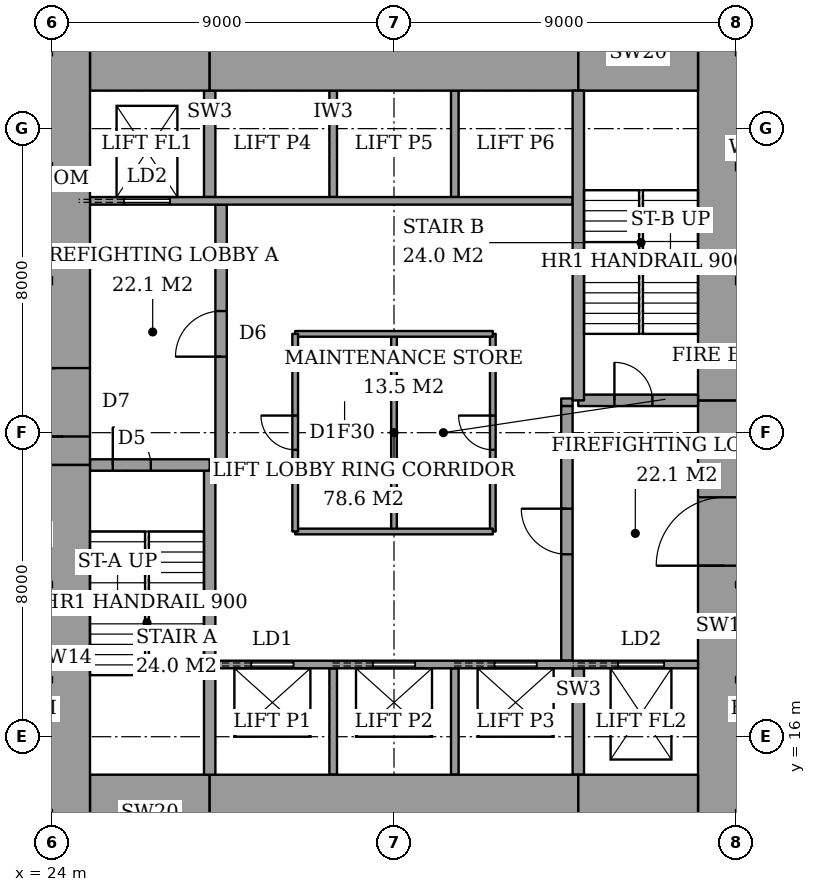
"""IFC4 building model, lengths in metres.
Left out: names, types, materials, properties, quantities, classifications, styles, units other than length and angle.
Written with IfcOpenShell. Run it as: python <this file> out.ifc"""

import sys

from ifc_helpers import new_model, si_unit, direction, frame, frame_2d, origin, place, context, subcontext, project, spatial, rectangle, extrude, element, fill, save


model = new_model("IFC4")
c1 = context("Model", 3, precision=1e-05, world=origin(), true_north=direction((0.0, 1.0)))
c2 = subcontext(c1, "Body", "Model", "MODEL_VIEW")
j1 = project(units=[si_unit("LENGTHUNIT", "METRE"), si_unit("PLANEANGLEUNIT", "RADIAN")], contexts=[c1])
p1 = place(None, origin())
s1 = spatial("IfcSite", under=j1, at=p1, CompositionType="ELEMENT")
p2 = place(p1, origin())
s2 = spatial("IfcBuilding", under=s1, at=p2, CompositionType="ELEMENT")
p3 = place(p2, frame((0.0, 0.0, 171.8)))
s3 = spatial("IfcBuildingStorey", under=s2, at=p3, CompositionType="ELEMENT", Elevation=171.8)
p4 = place(p3, frame((25.0, 14.0, 0.0), z_axis=(0.0, 0.0, 1.0), x_axis=(1.0, 0.0, 0.0)))
e1 = element("IfcWall", 1, at=p4, inside=s3, PredefinedType="SHEAR", context=c2, shape_type="SweptSolid", body=[
    extrude(rectangle(XDim=3.15, YDim=2.0, at=frame_2d((1.575, 0.0))), origin(), (0.0, 0.0, 1.0), 5.4),
])
p5 = place(p3, frame((28.15, 14.0, 0.0), z_axis=(0.0, 0.0, 1.0), x_axis=(1.0, 0.0, 0.0)))
e2 = element("IfcWall", 2, at=p5, inside=s3, PredefinedType="SHEAR", context=c2, shape_type="SweptSolid", body=[
    extrude(rectangle(XDim=9.7, YDim=2.0, at=frame_2d((4.85, 0.0))), origin(), (0.0, 0.0, 1.0), 5.4),
])
for number, where, z_axis, x_axis in (
    (3, (37.85, 14.0, 0.0), (0.0, 0.0, 1.0), (1.0, 0.0, 0.0)),
    (4, (25.0, 34.0, 0.0), (0.0, 0.0, 1.0), (1.0, 0.0, 0.0)),
):
    element("IfcWall", number, at=place(p3, frame(where, z_axis=z_axis, x_axis=x_axis)), inside=s3, PredefinedType="SHEAR", context=c2, shape_type="SweptSolid", body=[
        extrude(rectangle(XDim=3.15, YDim=2.0, at=frame_2d((1.575, 0.0))), origin(), (0.0, 0.0, 1.0), 5.4),
    ])
p6 = place(p3, frame((28.15, 34.0, 0.0), z_axis=(0.0, 0.0, 1.0), x_axis=(1.0, 0.0, 0.0)))
e5 = element("IfcWall", 5, at=p6, inside=s3, PredefinedType="SHEAR", context=c2, shape_type="SweptSolid", body=[
    extrude(rectangle(XDim=9.7, YDim=2.0, at=frame_2d((4.85, 0.0))), origin(), (0.0, 0.0, 1.0), 5.4),
])
p7 = place(p3, frame((37.85, 34.0, 0.0), z_axis=(0.0, 0.0, 1.0), x_axis=(1.0, 0.0, 0.0)))
e6 = element("IfcWall", 6, at=p7, inside=s3, PredefinedType="SHEAR", context=c2, shape_type="SweptSolid", body=[
    extrude(rectangle(XDim=3.15, YDim=2.0, at=frame_2d((1.575, 0.0))), origin(), (0.0, 0.0, 1.0), 5.4),
])
p8 = place(p3, frame((24.3, 13.0, 0.0), z_axis=(0.0, 0.0, 1.0), x_axis=(0.0, 1.0, 0.0)))
e7 = element("IfcWall", 7, at=p8, inside=s3, PredefinedType="SHEAR", context=c2, shape_type="SweptSolid", body=[
    extrude(rectangle(XDim=10.15, YDim=1.4, at=frame_2d((5.075, 0.0))), origin(), (0.0, 0.0, 1.0), 5.4),
])
p9 = place(p3, frame((24.3, 23.15, 0.0), z_axis=(0.0, 0.0, 1.0), x_axis=(0.0, 1.0, 0.0)))
e8 = element("IfcWall", 8, at=p9, inside=s3, PredefinedType="SHEAR", context=c2, shape_type="SweptSolid", body=[
    extrude(rectangle(XDim=11.85, YDim=1.4, at=frame_2d((5.925, 0.0))), origin(), (0.0, 0.0, 1.0), 5.4),
])
p10 = place(p9, frame((0.75, 0.0, 0.0)))
e9 = element("IfcOpeningElement", 9, at=p10, cuts=e8, PredefinedType="OPENING", context=c2, shape_type="SweptSolid", body=[
    extrude(rectangle(XDim=1.8, YDim=2.4, at=frame_2d((0.9, 1.2))), frame((0.0, 0.71, 0.0), z_axis=(0.0, -1.0, 0.0), x_axis=(1.0, 0.0, 0.0)), (0.0, 0.0, 1.0), 1.42),
])
p11 = place(p3, frame((41.7, 13.0, 0.0), z_axis=(0.0, 0.0, 1.0), x_axis=(0.0, 1.0, 0.0)))
e10 = element("IfcWall", 10, at=p11, inside=s3, PredefinedType="SHEAR", context=c2, shape_type="SweptSolid", body=[
    extrude(rectangle(XDim=11.85, YDim=1.4, at=frame_2d((5.925, 0.0))), origin(), (0.0, 0.0, 1.0), 5.4),
])
p12 = place(p11, frame((7.5, 0.0, 0.0)))
e11 = element("IfcOpeningElement", 11, at=p12, cuts=e10, PredefinedType="OPENING", context=c2, shape_type="SweptSolid", body=[
    extrude(rectangle(XDim=1.8, YDim=2.4, at=frame_2d((0.9, 1.2))), frame((0.0, 0.71, 0.0), z_axis=(0.0, -1.0, 0.0), x_axis=(1.0, 0.0, 0.0)), (0.0, 0.0, 1.0), 1.42),
])
p13 = place(p3, frame((41.7, 24.85, 0.0), z_axis=(0.0, 0.0, 1.0), x_axis=(0.0, 1.0, 0.0)))
e12 = element("IfcWall", 12, at=p13, inside=s3, PredefinedType="SHEAR", context=c2, shape_type="SweptSolid", body=[
    extrude(rectangle(XDim=10.15, YDim=1.4, at=frame_2d((5.075, 0.0))), origin(), (0.0, 0.0, 1.0), 5.4),
])
p14 = place(p3, frame((28.15, 15.0, 0.0), z_axis=(0.0, 0.0, 1.0), x_axis=(0.0, 1.0, 0.0)))
e13 = element("IfcWall", 13, at=p14, inside=s3, PredefinedType="SHEAR", context=c2, shape_type="SweptSolid", body=[
    extrude(rectangle(XDim=8.15, YDim=0.3, at=frame_2d((4.075, 0.0))), origin(), (0.0, 0.0, 1.0), 5.4),
])
p15 = place(p3, frame((25.0, 23.15, 0.0), z_axis=(0.0, 0.0, 1.0), x_axis=(1.0, 0.0, 0.0)))
e14 = element("IfcWall", 14, at=p15, inside=s3, PredefinedType="SHEAR", context=c2, shape_type="SweptSolid", body=[
    extrude(rectangle(XDim=3.15, YDim=0.3, at=frame_2d((1.575, 0.0))), origin(), (0.0, 0.0, 1.0), 5.4),
])
p16 = place(p15, frame((0.6, 0.0, 0.0)))
e15 = element("IfcOpeningElement", 15, at=p16, cuts=e14, PredefinedType="OPENING", context=c2, shape_type="SweptSolid", body=[
    extrude(rectangle(XDim=1.0, YDim=2.1, at=frame_2d((0.5, 1.05))), frame((0.0, 0.16, 0.0), z_axis=(0.0, -1.0, 0.0), x_axis=(1.0, 0.0, 0.0)), (0.0, 0.0, 1.0), 0.32),
])
p17 = place(p3, frame((37.85, 24.85, 0.0), z_axis=(0.0, 0.0, 1.0), x_axis=(0.0, 1.0, 0.0)))
e16 = element("IfcWall", 16, at=p17, inside=s3, PredefinedType="SHEAR", context=c2, shape_type="SweptSolid", body=[
    extrude(rectangle(XDim=8.15, YDim=0.3, at=frame_2d((4.075, 0.0))), origin(), (0.0, 0.0, 1.0), 5.4),
])
p18 = place(p3, frame((37.85, 24.85, 0.0), z_axis=(0.0, 0.0, 1.0), x_axis=(1.0, 0.0, 0.0)))
e17 = element("IfcWall", 17, at=p18, inside=s3, PredefinedType="SHEAR", context=c2, shape_type="SweptSolid", body=[
    extrude(rectangle(XDim=3.15, YDim=0.3, at=frame_2d((1.575, 0.0))), origin(), (0.0, 0.0, 1.0), 5.4),
])
p19 = place(p18, frame((0.95, 0.0, 0.0)))
e18 = element("IfcOpeningElement", 18, at=p19, cuts=e17, PredefinedType="OPENING", context=c2, shape_type="SweptSolid", body=[
    extrude(rectangle(XDim=1.0, YDim=2.1, at=frame_2d((0.5, 1.05))), frame((0.0, 0.16, 0.0), z_axis=(0.0, -1.0, 0.0), x_axis=(1.0, 0.0, 0.0)), (0.0, 0.0, 1.0), 0.32),
])
p20 = place(p3, frame((28.45, 23.3, 0.0), z_axis=(0.0, 0.0, 1.0), x_axis=(0.0, 1.0, 0.0)))
e19 = element("IfcWall", 19, at=p20, inside=s3, PredefinedType="PARTITIONING", context=c2, shape_type="SweptSolid", body=[
    extrude(rectangle(XDim=6.7, YDim=0.3, at=frame_2d((3.35, 0.0))), origin(), (0.0, 0.0, 1.0), 5.4),
])
p21 = place(p20, frame((2.7, 0.0, 0.0)))
e20 = element("IfcOpeningElement", 20, at=p21, cuts=e19, PredefinedType="OPENING", context=c2, shape_type="SweptSolid", body=[
    extrude(rectangle(XDim=1.2, YDim=2.1, at=frame_2d((0.6, 1.05))), frame((0.0, 0.16, 0.0), z_axis=(0.0, -1.0, 0.0), x_axis=(1.0, 0.0, 0.0)), (0.0, 0.0, 1.0), 0.32),
])
p22 = place(p3, frame((37.55, 18.0, 0.0), z_axis=(0.0, 0.0, 1.0), x_axis=(0.0, 1.0, 0.0)))
e21 = element("IfcWall", 21, at=p22, inside=s3, PredefinedType="PARTITIONING", context=c2, shape_type="SweptSolid", body=[
    extrude(rectangle(XDim=6.7, YDim=0.3, at=frame_2d((3.35, 0.0))), origin(), (0.0, 0.0, 1.0), 5.4),
])
p23 = place(p22, frame((2.8, 0.0, 0.0)))
e22 = element("IfcOpeningElement", 22, at=p23, cuts=e21, PredefinedType="OPENING", context=c2, shape_type="SweptSolid", body=[
    extrude(rectangle(XDim=1.2, YDim=2.1, at=frame_2d((0.6, 1.05))), frame((0.0, 0.16, 0.0), z_axis=(0.0, -1.0, 0.0), x_axis=(1.0, 0.0, 0.0)), (0.0, 0.0, 1.0), 0.32),
])
p24 = place(p3, frame((28.3, 17.9, 0.0), z_axis=(0.0, 0.0, 1.0), x_axis=(1.0, 0.0, 0.0)))
e23 = element("IfcWall", 23, at=p24, inside=s3, PredefinedType="PARTITIONING", context=c2, shape_type="SweptSolid", body=[
    extrude(rectangle(XDim=12.7, YDim=0.2, at=frame_2d((6.35, 0.0))), origin(), (0.0, 0.0, 1.0), 5.4),
])
p25 = place(p24, frame((0.95, 0.0, 0.0)))
e24 = element("IfcOpeningElement", 24, at=p25, cuts=e23, PredefinedType="OPENING", context=c2, shape_type="SweptSolid", body=[
    extrude(rectangle(XDim=1.1, YDim=2.1, at=frame_2d((0.55, 1.05))), frame((0.0, 0.11, 0.0), z_axis=(0.0, -1.0, 0.0), x_axis=(1.0, 0.0, 0.0)), (0.0, 0.0, 1.0), 0.22),
])
p26 = place(p24, frame((4.15, 0.0, 0.0)))
e25 = element("IfcOpeningElement", 25, at=p26, cuts=e23, PredefinedType="OPENING", context=c2, shape_type="SweptSolid", body=[
    extrude(rectangle(XDim=1.1, YDim=2.1, at=frame_2d((0.55, 1.05))), frame((0.0, 0.11, 0.0), z_axis=(0.0, -1.0, 0.0), x_axis=(1.0, 0.0, 0.0)), (0.0, 0.0, 1.0), 0.22),
])
p27 = place(p24, frame((7.35, 0.0, 0.0)))
e26 = element("IfcOpeningElement", 26, at=p27, cuts=e23, PredefinedType="OPENING", context=c2, shape_type="SweptSolid", body=[
    extrude(rectangle(XDim=1.1, YDim=2.1, at=frame_2d((0.55, 1.05))), frame((0.0, 0.11, 0.0), z_axis=(0.0, -1.0, 0.0), x_axis=(1.0, 0.0, 0.0)), (0.0, 0.0, 1.0), 0.22),
])
p28 = place(p24, frame((10.6, 0.0, 0.0)))
e27 = element("IfcOpeningElement", 27, at=p28, cuts=e23, PredefinedType="OPENING", context=c2, shape_type="SweptSolid", body=[
    extrude(rectangle(XDim=1.2, YDim=2.1, at=frame_2d((0.6, 1.05))), frame((0.0, 0.11, 0.0), z_axis=(0.0, -1.0, 0.0), x_axis=(1.0, 0.0, 0.0)), (0.0, 0.0, 1.0), 0.22),
])
p29 = place(p3, frame((25.0, 30.1, 0.0), z_axis=(0.0, 0.0, 1.0), x_axis=(1.0, 0.0, 0.0)))
e28 = element("IfcWall", 28, at=p29, inside=s3, PredefinedType="PARTITIONING", context=c2, shape_type="SweptSolid", body=[
    extrude(rectangle(XDim=12.7, YDim=0.2, at=frame_2d((6.35, 0.0))), origin(), (0.0, 0.0, 1.0), 5.4),
])
p30 = place(p29, frame((0.9, 0.0, 0.0)))
e29 = element("IfcOpeningElement", 29, at=p30, cuts=e28, PredefinedType="OPENING", context=c2, shape_type="SweptSolid", body=[
    extrude(rectangle(XDim=1.2, YDim=2.1, at=frame_2d((0.6, 1.05))), frame((0.0, 0.11, 0.0), z_axis=(0.0, -1.0, 0.0), x_axis=(1.0, 0.0, 0.0)), (0.0, 0.0, 1.0), 0.22),
])
for number, where, z_axis, x_axis in (
    (30, (31.4, 15.0, 0.0), (0.0, 0.0, 1.0), (0.0, 1.0, 0.0)),
    (31, (34.6, 15.0, 0.0), (0.0, 0.0, 1.0), (0.0, 1.0, 0.0)),
):
    element("IfcWall", number, at=place(p3, frame(where, z_axis=z_axis, x_axis=x_axis)), inside=s3, PredefinedType="PARTITIONING", context=c2, shape_type="SweptSolid", body=[
        extrude(rectangle(XDim=2.8, YDim=0.2, at=frame_2d((1.4, 0.0))), origin(), (0.0, 0.0, 1.0), 5.4),
    ])
p31 = place(p3, frame((37.85, 15.0, 0.0), z_axis=(0.0, 0.0, 1.0), x_axis=(0.0, 1.0, 0.0)))
e32 = element("IfcWall", 32, at=p31, inside=s3, PredefinedType="SHEAR", context=c2, shape_type="SweptSolid", body=[
    extrude(rectangle(XDim=2.8, YDim=0.3, at=frame_2d((1.4, 0.0))), origin(), (0.0, 0.0, 1.0), 5.4),
])
for number, where, z_axis, x_axis in (
    (33, (31.4, 30.2, 0.0), (0.0, 0.0, 1.0), (0.0, 1.0, 0.0)),
    (34, (34.6, 30.2, 0.0), (0.0, 0.0, 1.0), (0.0, 1.0, 0.0)),
):
    element("IfcWall", number, at=place(p3, frame(where, z_axis=z_axis, x_axis=x_axis)), inside=s3, PredefinedType="PARTITIONING", context=c2, shape_type="SweptSolid", body=[
        extrude(rectangle(XDim=2.8, YDim=0.2, at=frame_2d((1.4, 0.0))), origin(), (0.0, 0.0, 1.0), 5.4),
    ])
p32 = place(p3, frame((28.15, 30.2, 0.0), z_axis=(0.0, 0.0, 1.0), x_axis=(0.0, 1.0, 0.0)))
e35 = element("IfcWall", 35, at=p32, inside=s3, PredefinedType="SHEAR", context=c2, shape_type="SweptSolid", body=[
    extrude(rectangle(XDim=2.8, YDim=0.3, at=frame_2d((1.4, 0.0))), origin(), (0.0, 0.0, 1.0), 5.4),
])
for number, where, z_axis, x_axis in (
    (36, (28.3, 23.2, 0.0), (0.0, 0.0, 1.0), (1.0, 0.0, 0.0)),
    (37, (37.4, 24.8, 0.0), (0.0, 0.0, 1.0), (1.0, 0.0, 0.0)),
):
    element("IfcWall", number, at=place(p3, frame(where, z_axis=z_axis, x_axis=x_axis)), inside=s3, PredefinedType="PARTITIONING", context=c2, shape_type="SweptSolid", body=[
        extrude(rectangle(XDim=0.3, YDim=0.2, at=frame_2d((0.15, 0.0))), origin(), (0.0, 0.0, 1.0), 5.4),
    ])
for number, where, z_axis, x_axis in (
    (38, (30.4, 21.4, 0.0), (0.0, 0.0, 1.0), (1.0, 0.0, 0.0)),
    (39, (30.4, 26.6, 0.0), (0.0, 0.0, 1.0), (1.0, 0.0, 0.0)),
):
    element("IfcWall", number, at=place(p3, frame(where, z_axis=z_axis, x_axis=x_axis)), inside=s3, PredefinedType="PARTITIONING", context=c2, shape_type="SweptSolid", body=[
        extrude(rectangle(XDim=5.2, YDim=0.15, at=frame_2d((2.6, 0.0))), origin(), (0.0, 0.0, 1.0), 5.15),
    ])
p33 = place(p3, frame((30.4, 21.4, 0.0), z_axis=(0.0, 0.0, 1.0), x_axis=(0.0, 1.0, 0.0)))
e40 = element("IfcWall", 40, at=p33, inside=s3, PredefinedType="PARTITIONING", context=c2, shape_type="SweptSolid", body=[
    extrude(rectangle(XDim=5.2, YDim=0.15, at=frame_2d((2.6, 0.0))), origin(), (0.0, 0.0, 1.0), 5.15),
])
p34 = place(p33, frame((2.15, 0.0, 0.0)))
e41 = element("IfcOpeningElement", 41, at=p34, cuts=e40, PredefinedType="OPENING", context=c2, shape_type="SweptSolid", body=[
    extrude(rectangle(XDim=0.9, YDim=2.1, at=frame_2d((0.45, 1.05))), frame((0.0, 0.085, 0.0), z_axis=(0.0, -1.0, 0.0), x_axis=(1.0, 0.0, 0.0)), (0.0, 0.0, 1.0), 0.17),
])
p35 = place(p3, frame((35.6, 21.4, 0.0), z_axis=(0.0, 0.0, 1.0), x_axis=(0.0, 1.0, 0.0)))
e42 = element("IfcWall", 42, at=p35, inside=s3, PredefinedType="PARTITIONING", context=c2, shape_type="SweptSolid", body=[
    extrude(rectangle(XDim=5.2, YDim=0.15, at=frame_2d((2.6, 0.0))), origin(), (0.0, 0.0, 1.0), 5.15),
])
p36 = place(p35, frame((2.15, 0.0, 0.0)))
e43 = element("IfcOpeningElement", 43, at=p36, cuts=e42, PredefinedType="OPENING", context=c2, shape_type="SweptSolid", body=[
    extrude(rectangle(XDim=0.9, YDim=2.1, at=frame_2d((0.45, 1.05))), frame((0.0, 0.085, 0.0), z_axis=(0.0, -1.0, 0.0), x_axis=(1.0, 0.0, 0.0)), (0.0, 0.0, 1.0), 0.17),
])
p37 = place(p3, frame((33.0, 21.4, 0.0), z_axis=(0.0, 0.0, 1.0), x_axis=(0.0, 1.0, 0.0)))
e44 = element("IfcWall", 44, at=p37, inside=s3, PredefinedType="PARTITIONING", context=c2, shape_type="SweptSolid", body=[
    extrude(rectangle(XDim=5.2, YDim=0.15, at=frame_2d((2.6, 0.0))), origin(), (0.0, 0.0, 1.0), 5.15),
])
p38 = place(p16, origin())
e45 = element("IfcDoor", 45, at=p38, inside=s3, OperationType="SINGLE_SWING_RIGHT", PredefinedType="DOOR", context=c2, shape_type="SweptSolid", body=[
    extrude(rectangle(XDim=1.0, YDim=2.1, at=frame_2d((0.5, 1.05))), frame((0.0, 0.025, 0.0), z_axis=(0.0, -1.0, 0.0), x_axis=(1.0, 0.0, 0.0)), (0.0, 0.0, 1.0), 0.05),
])
fill(e15, e45)
p39 = place(p19, origin())
e46 = element("IfcDoor", 46, at=p39, inside=s3, OperationType="SINGLE_SWING_RIGHT", PredefinedType="DOOR", context=c2, shape_type="SweptSolid", body=[
    extrude(rectangle(XDim=1.0, YDim=2.1, at=frame_2d((0.5, 1.05))), frame((0.0, 0.025, 0.0), z_axis=(0.0, -1.0, 0.0), x_axis=(1.0, 0.0, 0.0)), (0.0, 0.0, 1.0), 0.05),
])
fill(e18, e46)
p40 = place(p21, origin())
e47 = element("IfcDoor", 47, at=p40, inside=s3, OperationType="SINGLE_SWING_RIGHT", PredefinedType="DOOR", context=c2, shape_type="SweptSolid", body=[
    extrude(rectangle(XDim=1.2, YDim=2.1, at=frame_2d((0.6, 1.05))), frame((0.0, 0.025, 0.0), z_axis=(0.0, -1.0, 0.0), x_axis=(1.0, 0.0, 0.0)), (0.0, 0.0, 1.0), 0.05),
])
fill(e20, e47)
p41 = place(p23, origin())
e48 = element("IfcDoor", 48, at=p41, inside=s3, OperationType="SINGLE_SWING_LEFT", PredefinedType="DOOR", context=c2, shape_type="SweptSolid", body=[
    extrude(rectangle(XDim=1.2, YDim=2.1, at=frame_2d((0.6, 1.05))), frame((0.0, 0.025, 0.0), z_axis=(0.0, -1.0, 0.0), x_axis=(1.0, 0.0, 0.0)), (0.0, 0.0, 1.0), 0.05),
])
fill(e22, e48)
p42 = place(p10, origin())
e49 = element("IfcDoor", 49, at=p42, inside=s3, OperationType="DOUBLE_DOOR_DOUBLE_SWING", PredefinedType="DOOR", context=c2, shape_type="SweptSolid", body=[
    extrude(rectangle(XDim=1.8, YDim=2.4, at=frame_2d((0.9, 1.2))), frame((0.0, 0.025, 0.0), z_axis=(0.0, -1.0, 0.0), x_axis=(1.0, 0.0, 0.0)), (0.0, 0.0, 1.0), 0.05),
])
fill(e9, e49)
p43 = place(p12, origin())
e50 = element("IfcDoor", 50, at=p43, inside=s3, OperationType="DOUBLE_DOOR_DOUBLE_SWING", PredefinedType="DOOR", context=c2, shape_type="SweptSolid", body=[
    extrude(rectangle(XDim=1.8, YDim=2.4, at=frame_2d((0.9, 1.2))), frame((0.0, 0.025, 0.0), z_axis=(0.0, -1.0, 0.0), x_axis=(1.0, 0.0, 0.0)), (0.0, 0.0, 1.0), 0.05),
])
fill(e11, e50)
p44 = place(p34, origin())
e51 = element("IfcDoor", 51, at=p44, inside=s3, OperationType="SINGLE_SWING_LEFT", PredefinedType="DOOR", context=c2, shape_type="SweptSolid", body=[
    extrude(rectangle(XDim=0.9, YDim=2.1, at=frame_2d((0.45, 1.05))), frame((0.0, 0.025, 0.0), z_axis=(0.0, -1.0, 0.0), x_axis=(1.0, 0.0, 0.0)), (0.0, 0.0, 1.0), 0.05),
])
fill(e41, e51)
p45 = place(p36, origin())
e52 = element("IfcDoor", 52, at=p45, inside=s3, OperationType="SINGLE_SWING_LEFT", PredefinedType="DOOR", context=c2, shape_type="SweptSolid", body=[
    extrude(rectangle(XDim=0.9, YDim=2.1, at=frame_2d((0.45, 1.05))), frame((0.0, 0.025, 0.0), z_axis=(0.0, -1.0, 0.0), x_axis=(1.0, 0.0, 0.0)), (0.0, 0.0, 1.0), 0.05),
])
fill(e43, e52)
p46 = place(p25, origin())
e53 = element("IfcDoor", 53, at=p46, inside=s3, OperationType="SLIDING_TO_LEFT", PredefinedType="DOOR", context=c2, shape_type="SweptSolid", body=[
    extrude(rectangle(XDim=1.1, YDim=2.1, at=frame_2d((0.55, 1.05))), frame((0.0, 0.025, 0.0), z_axis=(0.0, -1.0, 0.0), x_axis=(1.0, 0.0, 0.0)), (0.0, 0.0, 1.0), 0.05),
])
fill(e24, e53)
p47 = place(p26, origin())
e54 = element("IfcDoor", 54, at=p47, inside=s3, OperationType="SLIDING_TO_LEFT", PredefinedType="DOOR", context=c2, shape_type="SweptSolid", body=[
    extrude(rectangle(XDim=1.1, YDim=2.1, at=frame_2d((0.55, 1.05))), frame((0.0, 0.025, 0.0), z_axis=(0.0, -1.0, 0.0), x_axis=(1.0, 0.0, 0.0)), (0.0, 0.0, 1.0), 0.05),
])
fill(e25, e54)
p48 = place(p27, origin())
e55 = element("IfcDoor", 55, at=p48, inside=s3, OperationType="SLIDING_TO_LEFT", PredefinedType="DOOR", context=c2, shape_type="SweptSolid", body=[
    extrude(rectangle(XDim=1.1, YDim=2.1, at=frame_2d((0.55, 1.05))), frame((0.0, 0.025, 0.0), z_axis=(0.0, -1.0, 0.0), x_axis=(1.0, 0.0, 0.0)), (0.0, 0.0, 1.0), 0.05),
])
fill(e26, e55)
p49 = place(p30, origin())
e56 = element("IfcDoor", 56, at=p49, inside=s3, OperationType="SLIDING_TO_LEFT", PredefinedType="DOOR", context=c2, shape_type="SweptSolid", body=[
    extrude(rectangle(XDim=1.2, YDim=2.1, at=frame_2d((0.6, 1.05))), frame((0.0, 0.025, 0.0), z_axis=(0.0, -1.0, 0.0), x_axis=(1.0, 0.0, 0.0)), (0.0, 0.0, 1.0), 0.05),
])
fill(e29, e56)
p50 = place(p28, origin())
e57 = element("IfcDoor", 57, at=p50, inside=s3, OperationType="SLIDING_TO_LEFT", PredefinedType="DOOR", context=c2, shape_type="SweptSolid", body=[
    extrude(rectangle(XDim=1.2, YDim=2.1, at=frame_2d((0.6, 1.05))), frame((0.0, 0.025, 0.0), z_axis=(0.0, -1.0, 0.0), x_axis=(1.0, 0.0, 0.0)), (0.0, 0.0, 1.0), 0.05),
])
fill(e27, e57)
save(model, sys.argv[1])
